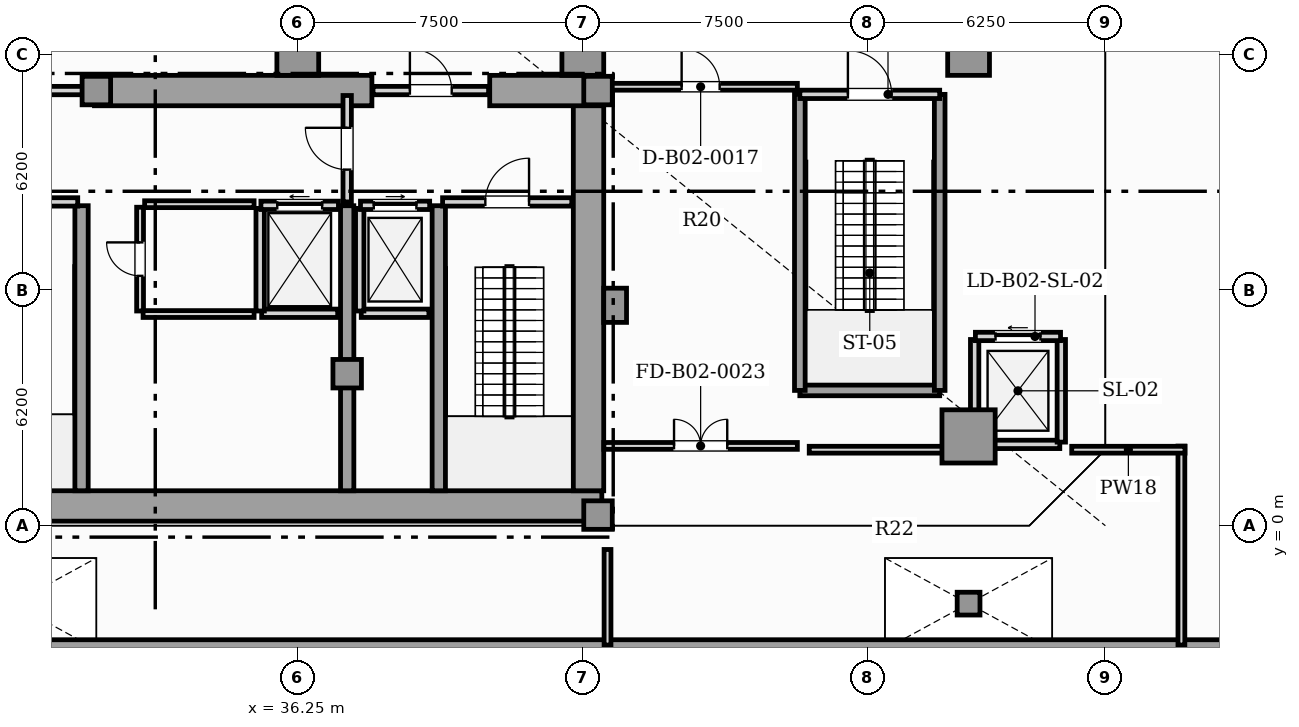
"""IFC4 building model, lengths in metres.
Left out: names, types, materials, properties, quantities, classifications, styles, units other than length and angle.
Written with IfcOpenShell. Run it as: python <this file> out.ifc"""

import sys

from ifc_helpers import new_model, si_unit, direction, frame, frame_2d, origin, origin_2d, place, context, subcontext, project, spatial, rectangle, hollow_rectangle, extrude, element, fill, save


model = new_model("IFC4")
c1 = context("Model", 3, precision=1e-05, world=origin(), true_north=direction((0.0, 1.0)))
c2 = subcontext(c1, "Body", "Model", "MODEL_VIEW")
j1 = project(units=[si_unit("LENGTHUNIT", "METRE"), si_unit("PLANEANGLEUNIT", "RADIAN")], contexts=[c1])
p1 = place(None, origin())
s1 = spatial("IfcSite", under=j1, at=p1, CompositionType="ELEMENT")
p2 = place(p1, origin())
s2 = spatial("IfcBuilding", under=s1, at=p2, CompositionType="ELEMENT")
p3 = place(p2, frame((0.0, 0.0, -10.8)))
s3 = spatial("IfcBuildingStorey", under=s2, at=p3, CompositionType="ELEMENT", Elevation=-10.8)
p4 = place(p3, frame((13.25, 0.52, 0.0), z_axis=(0.0, 0.0, 1.0), x_axis=(1.0, 0.0, 0.0)))
e1 = element("IfcWall", 1, at=p4, inside=s3, PredefinedType="SHEAR", context=c2, shape_type="SweptSolid", body=[
    extrude(rectangle(XDim=31.0, YDim=0.8, at=frame_2d((15.5, 0.0))), origin(), (0.0, 0.0, 1.0), 5.05),
])
p5 = place(p3, frame((43.9, 0.92, 0.0), z_axis=(0.0, 0.0, 1.0), x_axis=(0.0, 1.0, 0.0)))
e2 = element("IfcWall", 2, at=p5, inside=s3, PredefinedType="SHEAR", context=c2, shape_type="SweptSolid", body=[
    extrude(rectangle(XDim=10.53, YDim=0.8, at=frame_2d((5.265, 0.0))), origin(), (0.0, 0.0, 1.0), 5.05),
])
p6 = place(p3, frame((30.9, 11.45, 0.0), z_axis=(0.0, 0.0, 1.0), x_axis=(1.0, 0.0, 0.0)))
e3 = element("IfcWall", 3, at=p6, inside=s3, PredefinedType="SHEAR", context=c2, shape_type="SweptSolid", body=[
    extrude(rectangle(XDim=7.3, YDim=0.8, at=frame_2d((3.65, 0.0))), origin(), (0.0, 0.0, 1.0), 5.05),
])
p7 = place(p3, frame((41.3, 11.45, 0.0), z_axis=(0.0, 0.0, 1.0), x_axis=(1.0, 0.0, 0.0)))
e4 = element("IfcWall", 4, at=p7, inside=s3, PredefinedType="SHEAR", context=c2, shape_type="SweptSolid", body=[
    extrude(rectangle(XDim=2.95, YDim=0.8, at=frame_2d((1.475, 0.0))), origin(), (0.0, 0.0, 1.0), 5.05),
])
for number, where, z_axis, x_axis in (
    (5, (30.56, 0.92, 0.0), (0.0, 0.0, 1.0), (0.0, 1.0, 0.0)),
    (6, (37.55, 0.92, 0.0), (0.0, 0.0, 1.0), (0.0, 1.0, 0.0)),
    (7, (39.96, 0.92, 0.0), (0.0, 0.0, 1.0), (0.0, 1.0, 0.0)),
):
    element("IfcWall", number, at=place(p3, frame(where, z_axis=z_axis, x_axis=x_axis)), inside=s3, PredefinedType="SHEAR", context=c2, shape_type="SweptSolid", body=[
        extrude(rectangle(XDim=7.5, YDim=0.35, at=frame_2d((3.75, 0.0))), origin(), (0.0, 0.0, 1.0), 5.05),
    ])
p8 = place(p3, frame((44.6, 5.8, 0.0), z_axis=(0.0, 0.0, 1.0), x_axis=(1.0, 0.0, 0.0)))
e8 = element("IfcColumn", 8, at=p8, inside=s3, PredefinedType="PILASTER", context=c2, shape_type="SweptSolid", body=[
    extrude(rectangle(XDim=0.6, YDim=0.9, at=origin_2d()), origin(), (0.0, 0.0, 1.0), 5.4),
])
p9 = place(p3, frame((-7.9, -3.3, 0.0), z_axis=(0.0, 0.0, 1.0), x_axis=(1.0, 0.0, 0.0)))
e9 = element("IfcWall", 9, at=p9, inside=s3, PredefinedType="SOLIDWALL", context=c2, shape_type="SweptSolid", body=[
    extrude(rectangle(XDim=74.6, YDim=0.6, at=frame_2d((37.3, 0.0))), origin(), (0.0, 0.0, 1.0), 5.05),
])
for number, where, z_axis, x_axis in (
    (10, (44.15, 0.28, 0.0), (0.0, 0.0, 1.0), (1.0, 0.0, 0.0)),
    (11, (44.15, 11.45, 0.0), (0.0, 0.0, 1.0), (1.0, 0.0, 0.0)),
    (12, (37.55, 4.0, 0.0), (0.0, 0.0, 1.0), (1.0, 0.0, 0.0)),
    (13, (30.95, 11.45, 0.0), (0.0, 0.0, 1.0), (1.0, 0.0, 0.0)),
):
    element("IfcColumn", number, at=place(p3, frame(where, z_axis=z_axis, x_axis=x_axis)), inside=s3, PredefinedType="COLUMN", context=c2, shape_type="SweptSolid", body=[
        extrude(rectangle(XDim=0.75, YDim=0.75, at=origin_2d()), origin(), (0.0, 0.0, 1.0), 5.4),
    ])
p10 = place(p3, frame((53.9, 2.35, 0.0), z_axis=(0.0, 0.0, 1.0), x_axis=(1.0, 0.0, 0.0)))
e14 = element("IfcColumn", 14, at=p10, inside=s3, PredefinedType="USERDEFINED", context=c2, shape_type="SweptSolid", body=[
    extrude(hollow_rectangle(XDim=1.4, YDim=1.4, WallThickness=0.08, at=origin_2d()), origin(), (0.0, 0.0, 1.0), 5.4),
])
for number, where, z_axis, x_axis in (
    (15, (43.75, 12.4, 0.0), (0.0, 0.0, 1.0), (1.0, 0.0, 0.0)),
    (16, (53.9, 12.4, 0.0), (0.0, 0.0, 1.0), (1.0, 0.0, 0.0)),
    (17, (36.25, 12.4, 0.0), (0.0, 0.0, 1.0), (1.0, 0.0, 0.0)),
):
    element("IfcColumn", number, at=place(p3, frame(where, z_axis=z_axis, x_axis=x_axis)), inside=s3, PredefinedType="COLUMN", context=c2, shape_type="SweptSolid", body=[
        extrude(rectangle(XDim=1.1, YDim=1.1, at=origin_2d()), origin(), (0.0, 0.0, 1.0), 5.4),
    ])
p11 = place(p3, frame((53.9, -2.05, 0.0), z_axis=(0.0, 0.0, 1.0), x_axis=(1.0, 0.0, 0.0)))
e18 = element("IfcColumn", 18, at=p11, inside=s3, PredefinedType="COLUMN", context=c2, shape_type="SweptSolid", body=[
    extrude(hollow_rectangle(XDim=0.6, YDim=0.6, WallThickness=0.04, at=origin_2d()), origin(), (0.0, 0.0, 1.0), 5.4),
])
p12 = place(p3, frame((37.92, 5.59, 0.0), z_axis=(0.0, 0.0, 1.0), x_axis=(1.0, 0.0, 0.0)))
e19 = element("IfcWall", 19, at=p12, inside=s3, PredefinedType="SOLIDWALL", context=c2, shape_type="SweptSolid", body=[
    extrude(rectangle(XDim=1.78, YDim=0.22, at=frame_2d((0.89, 0.0))), origin(), (0.0, 0.0, 1.0), 5.05),
])
p13 = place(p3, frame((37.88, 5.65, 0.0), z_axis=(0.0, 0.0, 1.0), x_axis=(0.0, 1.0, 0.0)))
e20 = element("IfcWall", 20, at=p13, inside=s3, PredefinedType="SOLIDWALL", context=c2, shape_type="SweptSolid", body=[
    extrude(rectangle(XDim=2.7, YDim=0.22, at=frame_2d((1.35, 0.0))), origin(), (0.0, 0.0, 1.0), 5.05),
])
p14 = place(p3, frame((37.9, 8.43, 0.0), z_axis=(0.0, 0.0, 1.0), x_axis=(1.0, 0.0, 0.0)))
e21 = element("IfcWall", 21, at=p14, inside=s3, PredefinedType="SOLIDWALL", context=c2, shape_type="SweptSolid", body=[
    extrude(rectangle(XDim=1.82, YDim=0.22, at=frame_2d((0.91, 0.0))), origin(), (0.0, 0.0, 1.0), 5.05),
])
p15 = place(p14, frame((0.35, 0.0, 0.0)))
e22 = element("IfcOpeningElement", 22, at=p15, cuts=e21, PredefinedType="OPENING", context=c2, shape_type="SweptSolid", body=[
    extrude(rectangle(XDim=1.12, YDim=2.25, at=frame_2d((0.56, 1.125))), frame((0.0, 0.12, 0.0), z_axis=(0.0, -1.0, 0.0), x_axis=(1.0, 0.0, 0.0)), (0.0, 0.0, 1.0), 0.24),
])
p16 = place(p3, frame((35.3, 5.59, 0.0), z_axis=(0.0, 0.0, 1.0), x_axis=(1.0, 0.0, 0.0)))
e23 = element("IfcWall", 23, at=p16, inside=s3, PredefinedType="SOLIDWALL", context=c2, shape_type="SweptSolid", body=[
    extrude(rectangle(XDim=2.0, YDim=0.22, at=frame_2d((1.0, 0.0))), origin(), (0.0, 0.0, 1.0), 5.05),
])
p17 = place(p3, frame((35.26, 5.65, 0.0), z_axis=(0.0, 0.0, 1.0), x_axis=(0.0, 1.0, 0.0)))
e24 = element("IfcWall", 24, at=p17, inside=s3, PredefinedType="SOLIDWALL", context=c2, shape_type="SweptSolid", body=[
    extrude(rectangle(XDim=2.7, YDim=0.22, at=frame_2d((1.35, 0.0))), origin(), (0.0, 0.0, 1.0), 5.05),
])
p18 = place(p3, frame((35.28, 8.43, 0.0), z_axis=(0.0, 0.0, 1.0), x_axis=(1.0, 0.0, 0.0)))
e25 = element("IfcWall", 25, at=p18, inside=s3, PredefinedType="SOLIDWALL", context=c2, shape_type="SweptSolid", body=[
    extrude(rectangle(XDim=2.04, YDim=0.22, at=frame_2d((1.02, 0.0))), origin(), (0.0, 0.0, 1.0), 5.05),
])
p19 = place(p18, frame((0.43, 0.0, 0.0)))
e26 = element("IfcOpeningElement", 26, at=p19, cuts=e25, PredefinedType="OPENING", context=c2, shape_type="SweptSolid", body=[
    extrude(rectangle(XDim=1.18, YDim=2.2, at=frame_2d((0.59, 1.1))), frame((0.0, 0.12, 0.0), z_axis=(0.0, -1.0, 0.0), x_axis=(1.0, 0.0, 0.0)), (0.0, 0.0, 1.0), 0.24),
])
p20 = place(p3, frame((54.1, 2.14, 0.0), z_axis=(0.0, 0.0, 1.0), x_axis=(1.0, 0.0, 0.0)))
e27 = element("IfcWall", 27, at=p20, inside=s3, PredefinedType="SOLIDWALL", context=c2, shape_type="SweptSolid", body=[
    extrude(rectangle(XDim=2.2, YDim=0.22, at=frame_2d((1.1, 0.0))), origin(), (0.0, 0.0, 1.0), 5.05),
])
p21 = place(p3, frame((54.06, 2.2, 0.0), z_axis=(0.0, 0.0, 1.0), x_axis=(0.0, 1.0, 0.0)))
e28 = element("IfcWall", 28, at=p21, inside=s3, PredefinedType="SOLIDWALL", context=c2, shape_type="SweptSolid", body=[
    extrude(rectangle(XDim=2.7, YDim=0.22, at=frame_2d((1.35, 0.0))), origin(), (0.0, 0.0, 1.0), 4.433),
])
p22 = place(p3, frame((56.34, 2.2, 0.0), z_axis=(0.0, 0.0, 1.0), x_axis=(0.0, 1.0, 0.0)))
e29 = element("IfcWall", 29, at=p22, inside=s3, PredefinedType="SOLIDWALL", context=c2, shape_type="SweptSolid", body=[
    extrude(rectangle(XDim=2.7, YDim=0.22, at=frame_2d((1.35, 0.0))), origin(), (0.0, 0.0, 1.0), 5.05),
])
p23 = place(p3, frame((54.08, 4.98, 0.0), z_axis=(0.0, 0.0, 1.0), x_axis=(1.0, 0.0, 0.0)))
e30 = element("IfcWall", 30, at=p23, inside=s3, PredefinedType="SOLIDWALL", context=c2, shape_type="SweptSolid", body=[
    extrude(rectangle(XDim=2.24, YDim=0.22, at=frame_2d((1.12, 0.0))), origin(), (0.0, 0.0, 1.0), 5.05),
])
p24 = place(p23, frame((0.53, 0.0, 0.0)))
e31 = element("IfcOpeningElement", 31, at=p24, cuts=e30, PredefinedType="OPENING", context=c2, shape_type="SweptSolid", body=[
    extrude(rectangle(XDim=1.18, YDim=2.2, at=frame_2d((0.59, 1.1))), frame((0.0, 0.12, 0.0), z_axis=(0.0, -1.0, 0.0), x_axis=(1.0, 0.0, 0.0)), (0.0, 0.0, 1.0), 0.24),
])
p25 = place(p3, frame((40.06, 8.52, 0.0), z_axis=(0.0, 0.0, 1.0), x_axis=(1.0, 0.0, 0.0)))
e32 = element("IfcWall", 32, at=p25, inside=s3, PredefinedType="SOLIDWALL", context=c2, shape_type="SweptSolid", body=[
    extrude(rectangle(XDim=3.4, YDim=0.22, at=frame_2d((1.7, 0.0))), origin(), (0.0, 0.0, 1.0), 5.05),
])
p26 = place(p25, frame((1.125, 0.0, 0.0)))
e33 = element("IfcOpeningElement", 33, at=p26, cuts=e32, PredefinedType="OPENING", context=c2, shape_type="SweptSolid", body=[
    extrude(rectangle(XDim=1.15, YDim=2.2, at=frame_2d((0.575, 1.1))), frame((0.0, 0.12, 0.0), z_axis=(0.0, -1.0, 0.0), x_axis=(1.0, 0.0, 0.0)), (0.0, 0.0, 1.0), 0.24),
])
p27 = place(p3, frame((27.04, 8.52, 0.0), z_axis=(0.0, 0.0, 1.0), x_axis=(1.0, 0.0, 0.0)))
e34 = element("IfcWall", 34, at=p27, inside=s3, PredefinedType="SOLIDWALL", context=c2, shape_type="SweptSolid", body=[
    extrude(rectangle(XDim=3.42, YDim=0.22, at=frame_2d((1.71, 0.0))), origin(), (0.0, 0.0, 1.0), 5.05),
])
p28 = place(p27, frame((1.135, 0.0, 0.0)))
e35 = element("IfcOpeningElement", 35, at=p28, cuts=e34, PredefinedType="OPENING", context=c2, shape_type="SweptSolid", body=[
    extrude(rectangle(XDim=1.15, YDim=2.2, at=frame_2d((0.575, 1.1))), frame((0.0, 0.12, 0.0), z_axis=(0.0, -1.0, 0.0), x_axis=(1.0, 0.0, 0.0)), (0.0, 0.0, 1.0), 0.24),
])
p29 = place(p3, frame((49.46, 3.56, 0.0), z_axis=(0.0, 0.0, 1.0), x_axis=(1.0, 0.0, 0.0)))
e36 = element("IfcWall", 36, at=p29, inside=s3, PredefinedType="SHEAR", context=c2, shape_type="SweptSolid", body=[
    extrude(rectangle(XDim=3.68, YDim=0.28, at=frame_2d((1.84, 0.0))), origin(), (0.0, 0.0, 1.0), 5.05),
])
for number, where, z_axis, x_axis in (
    (37, (49.46, 3.56, 0.0), (0.0, 0.0, 1.0), (0.0, 1.0, 0.0)),
    (38, (53.14, 3.56, 0.0), (0.0, 0.0, 1.0), (0.0, 1.0, 0.0)),
):
    element("IfcWall", number, at=place(p3, frame(where, z_axis=z_axis, x_axis=x_axis)), inside=s3, PredefinedType="SHEAR", context=c2, shape_type="SweptSolid", body=[
        extrude(rectangle(XDim=7.79, YDim=0.28, at=frame_2d((3.895, 0.0))), origin(), (0.0, 0.0, 1.0), 5.05),
    ])
p30 = place(p3, frame((49.46, 11.35, 0.0), z_axis=(0.0, 0.0, 1.0), x_axis=(1.0, 0.0, 0.0)))
e39 = element("IfcWall", 39, at=p30, inside=s3, PredefinedType="SOLIDWALL", context=c2, shape_type="SweptSolid", body=[
    extrude(rectangle(XDim=3.68, YDim=0.22, at=frame_2d((1.84, 0.0))), origin(), (0.0, 0.0, 1.0), 5.05),
])
p31 = place(p30, frame((1.265, 0.0, 0.0)))
e40 = element("IfcOpeningElement", 40, at=p31, cuts=e39, PredefinedType="OPENING", context=c2, shape_type="SweptSolid", body=[
    extrude(rectangle(XDim=1.15, YDim=2.2, at=frame_2d((0.575, 1.1))), frame((0.0, 0.12, 0.0), z_axis=(0.0, -1.0, 0.0), x_axis=(1.0, 0.0, 0.0)), (0.0, 0.0, 1.0), 0.24),
])
p32 = place(p3, frame((37.55, 8.52, 0.0), z_axis=(0.0, 0.0, 1.0), x_axis=(0.0, 1.0, 0.0)))
e41 = element("IfcWall", 41, at=p32, inside=s3, PredefinedType="SOLIDWALL", context=c2, shape_type="SweptSolid", body=[
    extrude(rectangle(XDim=2.8, YDim=0.22, at=frame_2d((1.4, 0.0))), origin(), (0.0, 0.0, 1.0), 4.506),
])
p33 = place(p32, frame((0.85, 0.0, 0.0)))
e42 = element("IfcOpeningElement", 42, at=p33, cuts=e41, PredefinedType="OPENING", context=c2, shape_type="SweptSolid", body=[
    extrude(rectangle(XDim=1.1, YDim=2.2, at=frame_2d((0.55, 1.1))), frame((0.0, 0.12, 0.0), z_axis=(0.0, -1.0, 0.0), x_axis=(1.0, 0.0, 0.0)), (0.0, 0.0, 1.0), 0.24),
])
p34 = place(p3, frame((26.63, 11.45, 0.0), z_axis=(0.0, 0.0, 1.0), x_axis=(1.0, 0.0, 0.0)))
e43 = element("IfcWall", 43, at=p34, inside=s3, PredefinedType="SOLIDWALL", context=c2, shape_type="SweptSolid", body=[
    extrude(rectangle(XDim=4.24, YDim=0.22, at=frame_2d((2.12, 0.0))), origin(), (0.0, 0.0, 1.0), 5.05),
])
p35 = place(p34, frame((1.42, 0.0, 0.0)))
e44 = element("IfcOpeningElement", 44, at=p35, cuts=e43, PredefinedType="OPENING", context=c2, shape_type="SweptSolid", body=[
    extrude(rectangle(XDim=1.4, YDim=2.2, at=frame_2d((0.7, 1.1))), frame((0.0, 0.12, 0.0), z_axis=(0.0, -1.0, 0.0), x_axis=(1.0, 0.0, 0.0)), (0.0, 0.0, 1.0), 0.24),
])
p36 = place(p3, frame((38.23, 11.45, 0.0), z_axis=(0.0, 0.0, 1.0), x_axis=(1.0, 0.0, 0.0)))
e45 = element("IfcWall", 45, at=p36, inside=s3, PredefinedType="SOLIDWALL", context=c2, shape_type="SweptSolid", body=[
    extrude(rectangle(XDim=3.04, YDim=0.22, at=frame_2d((1.52, 0.0))), origin(), (0.0, 0.0, 1.0), 5.05),
])
p37 = place(p36, frame((0.97, 0.0, 0.0)))
e46 = element("IfcOpeningElement", 46, at=p37, cuts=e45, PredefinedType="OPENING", context=c2, shape_type="SweptSolid", body=[
    extrude(rectangle(XDim=1.1, YDim=2.2, at=frame_2d((0.55, 1.1))), frame((0.0, 0.12, 0.0), z_axis=(0.0, -1.0, 0.0), x_axis=(1.0, 0.0, 0.0)), (0.0, 0.0, 1.0), 0.24),
])
p38 = place(p3, frame((32.1, 5.65, 0.0), z_axis=(0.0, 0.0, 1.0), x_axis=(0.0, 1.0, 0.0)))
e47 = element("IfcWall", 47, at=p38, inside=s3, PredefinedType="PARTITIONING", context=c2, shape_type="SweptSolid", body=[
    extrude(rectangle(XDim=2.73, YDim=0.18, at=frame_2d((1.365, 0.0))), origin(), (0.0, 0.0, 1.0), 5.05),
])
p39 = place(p38, frame((0.925, 0.0, 0.0)))
e48 = element("IfcOpeningElement", 48, at=p39, cuts=e47, PredefinedType="OPENING", context=c2, shape_type="SweptSolid", body=[
    extrude(rectangle(XDim=0.88, YDim=2.05, at=frame_2d((0.44, 1.025))), frame((0.0, 0.1, 0.0), z_axis=(0.0, -1.0, 0.0), x_axis=(1.0, 0.0, 0.0)), (0.0, 0.0, 1.0), 0.2),
])
p40 = place(p3, frame((32.22, 8.46, 0.0), z_axis=(0.0, 0.0, 1.0), x_axis=(1.0, 0.0, 0.0)))
e49 = element("IfcWall", 49, at=p40, inside=s3, PredefinedType="PARTITIONING", context=c2, shape_type="SweptSolid", body=[
    extrude(rectangle(XDim=2.88, YDim=0.18, at=frame_2d((1.44, 0.0))), origin(), (0.0, 0.0, 1.0), 5.05),
])
p41 = place(p3, frame((32.18, 5.57, 0.0), z_axis=(0.0, 0.0, 1.0), x_axis=(1.0, 0.0, 0.0)))
e50 = element("IfcWall", 50, at=p41, inside=s3, PredefinedType="PARTITIONING", context=c2, shape_type="SweptSolid", body=[
    extrude(rectangle(XDim=2.92, YDim=0.18, at=frame_2d((1.46, 0.0))), origin(), (0.0, 0.0, 1.0), 5.05),
])
p42 = place(p3, frame((44.305, 11.55, 0.0), z_axis=(0.0, 0.0, 1.0), x_axis=(1.0, 0.0, 0.0)))
e51 = element("IfcWall", 51, at=p42, inside=s3, PredefinedType="PARTITIONING", context=c2, shape_type="SweptSolid", body=[
    extrude(rectangle(XDim=5.09, YDim=0.18, at=frame_2d((2.545, 0.0))), origin(), (0.0, 0.0, 1.0), 5.05),
])
p43 = place(p42, frame((2.045, 0.0, 0.0)))
e52 = element("IfcOpeningElement", 52, at=p43, cuts=e51, PredefinedType="OPENING", context=c2, shape_type="SweptSolid", body=[
    extrude(rectangle(XDim=1.0, YDim=2.15, at=frame_2d((0.5, 1.075))), frame((0.0, 0.1, 0.0), z_axis=(0.0, -1.0, 0.0), x_axis=(1.0, 0.0, 0.0)), (0.0, 0.0, 1.0), 0.2),
])
p44 = place(p3, frame((44.305, 2.1, 0.0), z_axis=(0.0, 0.0, 1.0), x_axis=(1.0, 0.0, 0.0)))
e53 = element("IfcWall", 53, at=p44, inside=s3, PredefinedType="PARTITIONING", context=c2, shape_type="SweptSolid", body=[
    extrude(rectangle(XDim=5.09, YDim=0.18, at=frame_2d((2.545, 0.0))), origin(), (0.0, 0.0, 1.0), 5.05),
])
p45 = place(p44, frame((1.845, 0.0, 0.0)))
e54 = element("IfcOpeningElement", 54, at=p45, cuts=e53, PredefinedType="OPENING", context=c2, shape_type="SweptSolid", body=[
    extrude(rectangle(XDim=1.4, YDim=2.2, at=frame_2d((0.7, 1.1))), frame((0.0, 0.1, 0.0), z_axis=(0.0, -1.0, 0.0), x_axis=(1.0, 0.0, 0.0)), (0.0, 0.0, 1.0), 0.2),
])
p46 = place(p3, frame((59.5, -3.14, 0.0), z_axis=(0.0, 0.0, 1.0), x_axis=(0.0, 1.0, 0.0)))
e55 = element("IfcWall", 55, at=p46, inside=s3, PredefinedType="PARTITIONING", context=c2, shape_type="SweptSolid", body=[
    extrude(rectangle(XDim=5.235, YDim=0.18, at=frame_2d((2.617, 0.0))), origin(), (0.0, 0.0, 1.0), 5.05),
])
p47 = place(p3, frame((59.595, 2.0, 0.0), z_axis=(0.0, 0.0, 1.0), x_axis=(-1.0, 0.0, 0.0)))
e56 = element("IfcWall", 56, at=p47, inside=s3, PredefinedType="PARTITIONING", context=c2, shape_type="SweptSolid", body=[
    extrude(rectangle(XDim=2.981, YDim=0.18, at=frame_2d((1.49, 0.0))), origin(), (0.0, 0.0, 1.0), 5.05),
])
p48 = place(p3, frame((53.786, 2.0, 0.0), z_axis=(0.0, 0.0, 1.0), x_axis=(-1.0, 0.0, 0.0)))
e57 = element("IfcWall", 57, at=p48, inside=s3, PredefinedType="PARTITIONING", context=c2, shape_type="SweptSolid", body=[
    extrude(rectangle(XDim=4.078, YDim=0.18, at=frame_2d((2.039, 0.0))), origin(), (0.0, 0.0, 1.0), 5.05),
])
p49 = place(p3, frame((44.4, -0.625, 0.0), z_axis=(0.0, 0.0, 1.0), x_axis=(0.0, -1.0, 0.0)))
e58 = element("IfcWall", 58, at=p49, inside=s3, PredefinedType="PARTITIONING", context=c2, shape_type="SweptSolid", body=[
    extrude(rectangle(XDim=2.515, YDim=0.18, at=frame_2d((1.257, 0.0))), origin(), (0.0, 0.0, 1.0), 5.05),
])
p50 = place(p15, origin())
e59 = element("IfcDoor", 59, at=p50, inside=s3, OperationType="SLIDING_TO_RIGHT", PredefinedType="DOOR", context=c2, shape_type="SweptSolid", body=[
    extrude(rectangle(XDim=1.12, YDim=2.25, at=frame_2d((0.56, 1.125))), frame((0.0, 0.025, 0.0), z_axis=(0.0, -1.0, 0.0), x_axis=(1.0, 0.0, 0.0)), (0.0, 0.0, 1.0), 0.05),
])
fill(e22, e59)
p51 = place(p19, origin())
e60 = element("IfcDoor", 60, at=p51, inside=s3, OperationType="SLIDING_TO_LEFT", PredefinedType="DOOR", context=c2, shape_type="SweptSolid", body=[
    extrude(rectangle(XDim=1.18, YDim=2.2, at=frame_2d((0.59, 1.1))), frame((0.0, 0.025, 0.0), z_axis=(0.0, -1.0, 0.0), x_axis=(1.0, 0.0, 0.0)), (0.0, 0.0, 1.0), 0.05),
])
fill(e26, e60)
p52 = place(p24, origin())
e61 = element("IfcDoor", 61, at=p52, inside=s3, OperationType="SLIDING_TO_LEFT", PredefinedType="DOOR", context=c2, shape_type="SweptSolid", body=[
    extrude(rectangle(XDim=1.18, YDim=2.2, at=frame_2d((0.59, 1.1))), frame((0.0, 0.025, 0.0), z_axis=(0.0, -1.0, 0.0), x_axis=(1.0, 0.0, 0.0)), (0.0, 0.0, 1.0), 0.05),
])
fill(e31, e61)
p53 = place(p26, origin())
e62 = element("IfcDoor", 62, at=p53, inside=s3, OperationType="SINGLE_SWING_RIGHT", PredefinedType="DOOR", context=c2, shape_type="SweptSolid", body=[
    extrude(rectangle(XDim=1.15, YDim=2.2, at=frame_2d((0.575, 1.1))), frame((0.0, 0.025, 0.0), z_axis=(0.0, -1.0, 0.0), x_axis=(1.0, 0.0, 0.0)), (0.0, 0.0, 1.0), 0.05),
])
fill(e33, e62)
p54 = place(p31, origin())
e63 = element("IfcDoor", 63, at=p54, inside=s3, OperationType="SINGLE_SWING_LEFT", PredefinedType="DOOR", context=c2, shape_type="SweptSolid", body=[
    extrude(rectangle(XDim=1.15, YDim=2.2, at=frame_2d((0.575, 1.1))), frame((0.0, 0.025, 0.0), z_axis=(0.0, -1.0, 0.0), x_axis=(1.0, 0.0, 0.0)), (0.0, 0.0, 1.0), 0.05),
])
fill(e40, e63)
p55 = place(p33, origin())
e64 = element("IfcDoor", 64, at=p55, inside=s3, OperationType="SINGLE_SWING_RIGHT", PredefinedType="DOOR", context=c2, shape_type="SweptSolid", body=[
    extrude(rectangle(XDim=1.1, YDim=2.2, at=frame_2d((0.55, 1.1))), frame((0.0, 0.025, 0.0), z_axis=(0.0, -1.0, 0.0), x_axis=(1.0, 0.0, 0.0)), (0.0, 0.0, 1.0), 0.05),
])
fill(e42, e64)
p56 = place(p37, origin())
e65 = element("IfcDoor", 65, at=p56, inside=s3, OperationType="SINGLE_SWING_LEFT", PredefinedType="DOOR", context=c2, shape_type="SweptSolid", body=[
    extrude(rectangle(XDim=1.1, YDim=2.2, at=frame_2d((0.55, 1.1))), frame((0.0, 0.025, 0.0), z_axis=(0.0, -1.0, 0.0), x_axis=(1.0, 0.0, 0.0)), (0.0, 0.0, 1.0), 0.05),
])
fill(e46, e65)
p57 = place(p39, origin())
e66 = element("IfcDoor", 66, at=p57, inside=s3, OperationType="SINGLE_SWING_RIGHT", PredefinedType="DOOR", context=c2, shape_type="SweptSolid", body=[
    extrude(rectangle(XDim=0.88, YDim=2.05, at=frame_2d((0.44, 1.025))), frame((0.0, 0.025, 0.0), z_axis=(0.0, -1.0, 0.0), x_axis=(1.0, 0.0, 0.0)), (0.0, 0.0, 1.0), 0.05),
])
fill(e48, e66)
p58 = place(p43, origin())
e67 = element("IfcDoor", 67, at=p58, inside=s3, OperationType="SINGLE_SWING_LEFT", PredefinedType="DOOR", context=c2, shape_type="SweptSolid", body=[
    extrude(rectangle(XDim=1.0, YDim=2.15, at=frame_2d((0.5, 1.075))), frame((0.0, 0.025, 0.0), z_axis=(0.0, -1.0, 0.0), x_axis=(1.0, 0.0, 0.0)), (0.0, 0.0, 1.0), 0.05),
])
fill(e52, e67)
p59 = place(p45, origin())
e68 = element("IfcDoor", 68, at=p59, inside=s3, OperationType="DOUBLE_DOOR_SINGLE_SWING", PredefinedType="DOOR", context=c2, shape_type="SweptSolid", body=[
    extrude(rectangle(XDim=1.4, YDim=2.2, at=frame_2d((0.7, 1.1))), frame((0.0, 0.025, 0.0), z_axis=(0.0, -1.0, 0.0), x_axis=(1.0, 0.0, 0.0)), (0.0, 0.0, 1.0), 0.05),
])
fill(e54, e68)
save(model, sys.argv[1])
